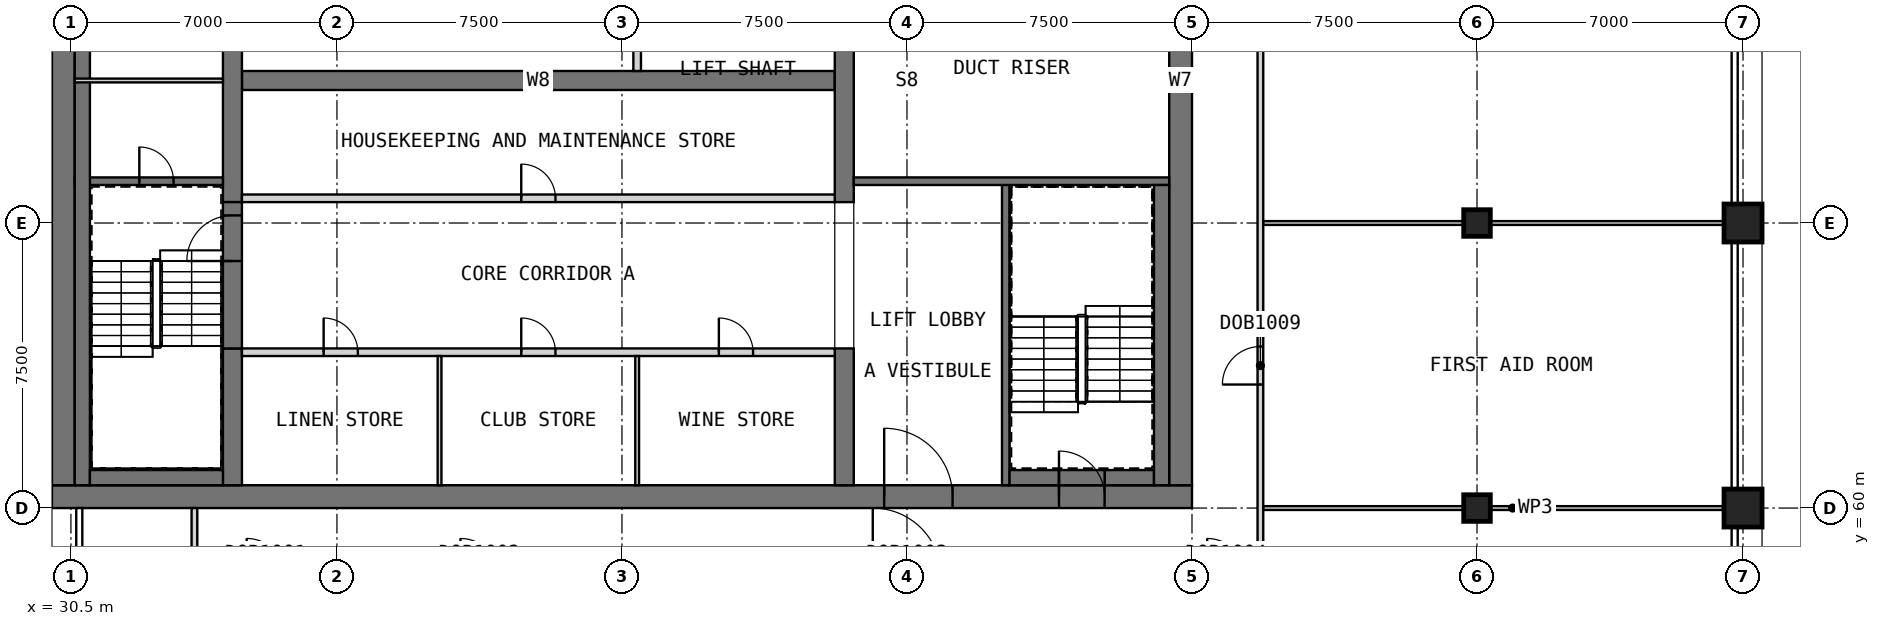
"""IFC4 building model, lengths in metres.
Left out: names, types, materials, properties, quantities, classifications, styles, units other than length and angle.
Written with IfcOpenShell. Run it as: python <this file> out.ifc"""

import sys

from ifc_helpers import new_model, si_unit, direction, frame, frame_2d, origin, origin_2d, place, context, subcontext, project, spatial, rectangle, extrude, element, fill, save


model = new_model("IFC4")
c1 = context("Model", 3, precision=1e-05, world=origin(), true_north=direction((0.0, 1.0)))
c2 = subcontext(c1, "Body", "Model", "MODEL_VIEW")
j1 = project(units=[si_unit("LENGTHUNIT", "METRE"), si_unit("PLANEANGLEUNIT", "RADIAN")], contexts=[c1])
p1 = place(None, origin())
s1 = spatial("IfcSite", under=j1, at=p1, CompositionType="ELEMENT")
p2 = place(p1, origin())
s2 = spatial("IfcBuilding", under=s1, at=p2, CompositionType="ELEMENT")
p3 = place(p2, frame((0.0, 0.0, 302.7)))
s3 = spatial("IfcBuildingStorey", under=s2, at=p3, CompositionType="ELEMENT", Elevation=302.7)
for number, where, z_axis, x_axis in (
    (1, (67.5, 60.0, 0.0), (0.0, 0.0, 1.0), (1.0, 0.0, 0.0)),
    (2, (67.5, 67.5, 0.0), (0.0, 0.0, 1.0), (1.0, 0.0, 0.0)),
):
    element("IfcColumn", number, at=place(p3, frame(where, z_axis=z_axis, x_axis=x_axis)), inside=s3, PredefinedType="COLUMN", context=c2, shape_type="SweptSolid", body=[
        extrude(rectangle(XDim=0.7, YDim=0.7, at=origin_2d()), origin(), (0.0, 0.0, 1.0), 6.0),
    ])
for number, where, z_axis, x_axis in (
    (3, (74.5, 60.0, 0.0), (0.0, 0.0, 1.0), (1.0, 0.0, 0.0)),
    (4, (74.5, 67.5, 0.0), (0.0, 0.0, 1.0), (1.0, 0.0, 0.0)),
):
    element("IfcColumn", number, at=place(p3, frame(where, z_axis=z_axis, x_axis=x_axis)), inside=s3, PredefinedType="COLUMN", context=c2, shape_type="SweptSolid", body=[
        extrude(rectangle(XDim=1.0, YDim=1.0, at=origin_2d()), origin(), (0.0, 0.0, 1.0), 6.0),
    ])
p4 = place(p3, frame((30.0, 60.3, 0.0), z_axis=(0.0, 0.0, 1.0), x_axis=(1.0, 0.0, 0.0)))
e5 = element("IfcWall", 5, at=p4, inside=s3, PredefinedType="SHEAR", context=c2, shape_type="SweptSolid", body=[
    extrude(rectangle(XDim=30.0, YDim=0.6, at=frame_2d((15.0, 0.0))), origin(), (0.0, 0.0, 1.0), 6.0),
])
p5 = place(p4, frame((21.9, 0.0, 0.0)))
e6 = element("IfcOpeningElement", 6, at=p5, cuts=e5, PredefinedType="OPENING", context=c2, shape_type="SweptSolid", body=[
    extrude(rectangle(XDim=1.8, YDim=2.1, at=frame_2d((0.9, 1.05))), frame((0.0, 0.31, 0.0), z_axis=(0.0, -1.0, 0.0), x_axis=(1.0, 0.0, 0.0)), (0.0, 0.0, 1.0), 0.62),
])
p6 = place(p4, frame((26.5, 0.0, 0.0)))
e7 = element("IfcOpeningElement", 7, at=p6, cuts=e5, PredefinedType="OPENING", context=c2, shape_type="SweptSolid", body=[
    extrude(rectangle(XDim=1.2, YDim=2.1, at=frame_2d((0.6, 1.05))), frame((0.0, 0.31, 0.0), z_axis=(0.0, -1.0, 0.0), x_axis=(1.0, 0.0, 0.0)), (0.0, 0.0, 1.0), 0.62),
])
p7 = place(p3, frame((30.3, 60.6, 0.0), z_axis=(0.0, 0.0, 1.0), x_axis=(0.0, 1.0, 0.0)))
e8 = element("IfcWall", 8, at=p7, inside=s3, PredefinedType="SHEAR", context=c2, shape_type="SweptSolid", body=[
    extrude(rectangle(XDim=21.3, YDim=0.6, at=frame_2d((10.65, 0.0))), origin(), (0.0, 0.0, 1.0), 6.0),
])
p8 = place(p3, frame((59.7, 60.6, 0.0), z_axis=(0.0, 0.0, 1.0), x_axis=(0.0, 1.0, 0.0)))
e9 = element("IfcWall", 9, at=p8, inside=s3, PredefinedType="SHEAR", context=c2, shape_type="SweptSolid", body=[
    extrude(rectangle(XDim=21.3, YDim=0.6, at=frame_2d((10.65, 0.0))), origin(), (0.0, 0.0, 1.0), 6.0),
])
p9 = place(p8, frame((14.9, 0.0, 0.0)))
e10 = element("IfcOpeningElement", 10, at=p9, cuts=e9, PredefinedType="OPENING", context=c2, shape_type="SweptSolid", body=[
    extrude(rectangle(XDim=1.8, YDim=2.1, at=frame_2d((0.9, 1.05))), frame((0.0, 0.31, 0.0), z_axis=(0.0, -1.0, 0.0), x_axis=(1.0, 0.0, 0.0)), (0.0, 0.0, 1.0), 0.62),
])
p10 = place(p3, frame((35.0, 71.25, 0.0), z_axis=(0.0, 0.0, 1.0), x_axis=(1.0, 0.0, 0.0)))
e11 = element("IfcWall", 11, at=p10, inside=s3, PredefinedType="SHEAR", context=c2, shape_type="SweptSolid", body=[
    extrude(rectangle(XDim=15.6, YDim=0.5, at=frame_2d((7.8, 0.0))), origin(), (0.0, 0.0, 1.0), 6.0),
])
p11 = place(p3, frame((34.75, 60.6, 0.0), z_axis=(0.0, 0.0, 1.0), x_axis=(0.0, 1.0, 0.0)))
e12 = element("IfcWall", 12, at=p11, inside=s3, PredefinedType="SHEAR", context=c2, shape_type="SweptSolid", body=[
    extrude(rectangle(XDim=3.6, YDim=0.5, at=frame_2d((1.8, 0.0))), origin(), (0.0, 0.0, 1.0), 6.0),
])
p12 = place(p3, frame((34.75, 68.05, 0.0), z_axis=(0.0, 0.0, 1.0), x_axis=(0.0, 1.0, 0.0)))
e13 = element("IfcWall", 13, at=p12, inside=s3, PredefinedType="SHEAR", context=c2, shape_type="SweptSolid", body=[
    extrude(rectangle(XDim=6.4, YDim=0.5, at=frame_2d((3.2, 0.0))), origin(), (0.0, 0.0, 1.0), 6.0),
])
p13 = place(p3, frame((50.85, 60.6, 0.0), z_axis=(0.0, 0.0, 1.0), x_axis=(0.0, 1.0, 0.0)))
e14 = element("IfcWall", 14, at=p13, inside=s3, PredefinedType="SHEAR", context=c2, shape_type="SweptSolid", body=[
    extrude(rectangle(XDim=3.6, YDim=0.5, at=frame_2d((1.8, 0.0))), origin(), (0.0, 0.0, 1.0), 6.0),
])
p14 = place(p3, frame((50.85, 68.05, 0.0), z_axis=(0.0, 0.0, 1.0), x_axis=(0.0, 1.0, 0.0)))
e15 = element("IfcWall", 15, at=p14, inside=s3, PredefinedType="SHEAR", context=c2, shape_type="SweptSolid", body=[
    extrude(rectangle(XDim=6.4, YDim=0.5, at=frame_2d((3.2, 0.0))), origin(), (0.0, 0.0, 1.0), 6.0),
])
p15 = place(p3, frame((35.0, 64.1, 0.0), z_axis=(0.0, 0.0, 1.0), x_axis=(1.0, 0.0, 0.0)))
e16 = element("IfcWall", 16, at=p15, inside=s3, PredefinedType="PARTITIONING", context=c2, shape_type="SweptSolid", body=[
    extrude(rectangle(XDim=15.6, YDim=0.2, at=frame_2d((7.8, 0.0))), origin(), (0.0, 0.0, 1.0), 5.7),
])
p16 = place(p15, frame((2.15, 0.0, 0.0)))
e17 = element("IfcOpeningElement", 17, at=p16, cuts=e16, PredefinedType="OPENING", context=c2, shape_type="SweptSolid", body=[
    extrude(rectangle(XDim=0.9, YDim=2.1, at=frame_2d((0.45, 1.05))), frame((0.0, 0.11, 0.0), z_axis=(0.0, -1.0, 0.0), x_axis=(1.0, 0.0, 0.0)), (0.0, 0.0, 1.0), 0.22),
])
p17 = place(p15, frame((7.35, 0.0, 0.0)))
e18 = element("IfcOpeningElement", 18, at=p17, cuts=e16, PredefinedType="OPENING", context=c2, shape_type="SweptSolid", body=[
    extrude(rectangle(XDim=0.9, YDim=2.1, at=frame_2d((0.45, 1.05))), frame((0.0, 0.11, 0.0), z_axis=(0.0, -1.0, 0.0), x_axis=(1.0, 0.0, 0.0)), (0.0, 0.0, 1.0), 0.22),
])
p18 = place(p15, frame((12.55, 0.0, 0.0)))
e19 = element("IfcOpeningElement", 19, at=p18, cuts=e16, PredefinedType="OPENING", context=c2, shape_type="SweptSolid", body=[
    extrude(rectangle(XDim=0.9, YDim=2.1, at=frame_2d((0.45, 1.05))), frame((0.0, 0.11, 0.0), z_axis=(0.0, -1.0, 0.0), x_axis=(1.0, 0.0, 0.0)), (0.0, 0.0, 1.0), 0.22),
])
for number, where, z_axis, x_axis in (
    (20, (40.2, 60.6, 0.0), (0.0, 0.0, 1.0), (0.0, 1.0, 0.0)),
    (21, (45.4, 60.6, 0.0), (0.0, 0.0, 1.0), (0.0, 1.0, 0.0)),
):
    element("IfcWall", number, at=place(p3, frame(where, z_axis=z_axis, x_axis=x_axis)), inside=s3, PredefinedType="PARTITIONING", context=c2, shape_type="SweptSolid", body=[
        extrude(rectangle(XDim=3.4, YDim=0.1, at=frame_2d((1.7, 0.0))), origin(), (0.0, 0.0, 1.0), 5.7),
    ])
p19 = place(p3, frame((35.0, 68.15, 0.0), z_axis=(0.0, 0.0, 1.0), x_axis=(1.0, 0.0, 0.0)))
e22 = element("IfcWall", 22, at=p19, inside=s3, PredefinedType="PARTITIONING", context=c2, shape_type="SweptSolid", body=[
    extrude(rectangle(XDim=15.6, YDim=0.2, at=frame_2d((7.8, 0.0))), origin(), (0.0, 0.0, 1.0), 5.7),
])
p20 = place(p19, frame((7.35, 0.0, 0.0)))
e23 = element("IfcOpeningElement", 23, at=p20, cuts=e22, PredefinedType="OPENING", context=c2, shape_type="SweptSolid", body=[
    extrude(rectangle(XDim=0.9, YDim=2.1, at=frame_2d((0.45, 1.05))), frame((0.0, 0.11, 0.0), z_axis=(0.0, -1.0, 0.0), x_axis=(1.0, 0.0, 0.0)), (0.0, 0.0, 1.0), 0.22),
])
p21 = place(p3, frame((45.4, 71.5, 0.0), z_axis=(0.0, 0.0, 1.0), x_axis=(0.0, 1.0, 0.0)))
e24 = element("IfcWall", 24, at=p21, inside=s3, PredefinedType="SOLIDWALL", context=c2, shape_type="SweptSolid", body=[
    extrude(rectangle(XDim=2.0, YDim=0.2, at=frame_2d((1.0, 0.0))), origin(), (0.0, 0.0, 1.0), 6.0),
])
p22 = place(p3, frame((34.75, 64.2, 0.0), z_axis=(0.0, 0.0, 1.0), x_axis=(0.0, 1.0, 0.0)))
e25 = element("IfcWall", 25, at=p22, inside=s3, PredefinedType="SOLIDWALL", context=c2, shape_type="SweptSolid", body=[
    extrude(rectangle(XDim=3.85, YDim=0.5, at=frame_2d((1.925, 0.0))), origin(), (0.0, 0.0, 1.0), 4.8),
])
p23 = place(p22, frame((2.3, 0.0, 0.0)))
e26 = element("IfcOpeningElement", 26, at=p23, cuts=e25, PredefinedType="OPENING", context=c2, shape_type="SweptSolid", body=[
    extrude(rectangle(XDim=1.2, YDim=2.1, at=frame_2d((0.6, 1.05))), frame((0.0, 0.26, 0.0), z_axis=(0.0, -1.0, 0.0), x_axis=(1.0, 0.0, 0.0)), (0.0, 0.0, 1.0), 0.52),
])
p24 = place(p3, frame((30.6, 68.6, 0.0), z_axis=(0.0, 0.0, 1.0), x_axis=(1.0, 0.0, 0.0)))
e27 = element("IfcWall", 27, at=p24, inside=s3, PredefinedType="SOLIDWALL", context=c2, shape_type="SweptSolid", body=[
    extrude(rectangle(XDim=3.9, YDim=0.2, at=frame_2d((1.95, 0.0))), origin(), (0.0, 0.0, 1.0), 5.7),
])
p25 = place(p24, frame((1.7, 0.0, 0.0)))
e28 = element("IfcOpeningElement", 28, at=p25, cuts=e27, PredefinedType="OPENING", context=c2, shape_type="SweptSolid", body=[
    extrude(rectangle(XDim=0.9, YDim=2.1, at=frame_2d((0.45, 1.05))), frame((0.0, 0.11, 0.0), z_axis=(0.0, -1.0, 0.0), x_axis=(1.0, 0.0, 0.0)), (0.0, 0.0, 1.0), 0.22),
])
p26 = place(p3, frame((55.1, 60.6, 0.0), z_axis=(0.0, 0.0, 1.0), x_axis=(0.0, 1.0, 0.0)))
e29 = element("IfcWall", 29, at=p26, inside=s3, PredefinedType="SOLIDWALL", context=c2, shape_type="SweptSolid", body=[
    extrude(rectangle(XDim=8.0, YDim=0.2, at=frame_2d((4.0, 0.0))), origin(), (0.0, 0.0, 1.0), 5.7),
])
p27 = place(p3, frame((51.1, 68.6, 0.0), z_axis=(0.0, 0.0, 1.0), x_axis=(1.0, 0.0, 0.0)))
e30 = element("IfcWall", 30, at=p27, inside=s3, PredefinedType="SOLIDWALL", context=c2, shape_type="SweptSolid", body=[
    extrude(rectangle(XDim=8.3, YDim=0.2, at=frame_2d((4.15, 0.0))), origin(), (0.0, 0.0, 1.0), 5.7),
])
p28 = place(p3, frame((30.8, 60.6, 0.0), z_axis=(0.0, 0.0, 1.0), x_axis=(0.0, 1.0, 0.0)))
e31 = element("IfcWall", 31, at=p28, inside=s3, PredefinedType="SOLIDWALL", context=c2, shape_type="SweptSolid", body=[
    extrude(rectangle(XDim=21.3, YDim=0.4, at=frame_2d((10.65, 0.0))), origin(), (0.0, 0.0, 1.0), 5.7),
])
p29 = place(p3, frame((31.0, 60.8, 0.0), z_axis=(0.0, 0.0, 1.0), x_axis=(1.0, 0.0, 0.0)))
e32 = element("IfcWall", 32, at=p29, inside=s3, PredefinedType="SOLIDWALL", context=c2, shape_type="SweptSolid", body=[
    extrude(rectangle(XDim=3.5, YDim=0.4, at=frame_2d((1.75, 0.0))), origin(), (0.0, 0.0, 1.0), 5.7),
])
for number, where, z_axis, x_axis in (
    (33, (55.2, 60.8, 0.0), (0.0, 0.0, 1.0), (1.0, 0.0, 0.0)),
    (34, (57.7, 60.8, 0.0), (0.0, 0.0, 1.0), (1.0, 0.0, 0.0)),
):
    element("IfcWall", number, at=place(p3, frame(where, z_axis=z_axis, x_axis=x_axis)), inside=s3, PredefinedType="SOLIDWALL", context=c2, shape_type="SweptSolid", body=[
        extrude(rectangle(XDim=1.3, YDim=0.4, at=frame_2d((0.65, 0.0))), origin(), (0.0, 0.0, 1.0), 5.7),
    ])
p30 = place(p3, frame((59.2, 60.6, 0.0), z_axis=(0.0, 0.0, 1.0), x_axis=(0.0, 1.0, 0.0)))
e35 = element("IfcWall", 35, at=p30, inside=s3, PredefinedType="SOLIDWALL", context=c2, shape_type="SweptSolid", body=[
    extrude(rectangle(XDim=7.9, YDim=0.4, at=frame_2d((3.95, 0.0))), origin(), (0.0, 0.0, 1.0), 5.7),
])
p31 = place(p3, frame((56.5, 60.8, 3.2), z_axis=(0.0, 0.0, 1.0), x_axis=(1.0, 0.0, 0.0)))
e36 = element("IfcWall", 36, at=p31, inside=s3, PredefinedType="SOLIDWALL", context=c2, shape_type="SweptSolid", body=[
    extrude(rectangle(XDim=1.2, YDim=0.4, at=frame_2d((0.6, 0.0))), origin(), (0.0, 0.0, 1.0), 2.5),
])
p32 = place(p3, frame((30.6, 71.25, 0.0), z_axis=(0.0, 0.0, 1.0), x_axis=(1.0, 0.0, 0.0)))
e37 = element("IfcWall", 37, at=p32, inside=s3, PredefinedType="PARTITIONING", context=c2, shape_type="SweptSolid", body=[
    extrude(rectangle(XDim=3.9, YDim=0.1, at=frame_2d((1.95, 0.0))), origin(), (0.0, 0.0, 1.0), 5.7),
])
p33 = place(p3, frame((33.75, 58.275, 0.0), z_axis=(0.0, 0.0, 1.0), x_axis=(0.0, 1.0, 0.0)))
e38 = element("IfcWall", 38, at=p33, inside=s3, PredefinedType="PARTITIONING", context=c2, shape_type="SweptSolid", body=[
    extrude(rectangle(XDim=1.725, YDim=0.15, at=frame_2d((0.863, 0.0))), origin(), (0.0, 0.0, 1.0), 5.7),
])
p34 = place(p3, frame((61.8, 58.275, 0.0), z_axis=(0.0, 0.0, 1.0), x_axis=(0.0, 1.0, 0.0)))
e39 = element("IfcWall", 39, at=p34, inside=s3, PredefinedType="PARTITIONING", context=c2, shape_type="SweptSolid", body=[
    extrude(rectangle(XDim=25.95, YDim=0.15, at=frame_2d((12.975, 0.0))), origin(), (0.0, 0.0, 1.0), 5.7),
])
p35 = place(p34, frame((4.975, 0.0, 0.0)))
e40 = element("IfcOpeningElement", 40, at=p35, cuts=e39, PredefinedType="OPENING", context=c2, shape_type="SweptSolid", body=[
    extrude(rectangle(XDim=1.0, YDim=2.1, at=frame_2d((0.5, 1.05))), frame((0.0, 0.085, 0.0), z_axis=(0.0, -1.0, 0.0), x_axis=(1.0, 0.0, 0.0)), (0.0, 0.0, 1.0), 0.17),
])
p36 = place(p34, frame((13.95, 0.0, 0.0)))
e41 = element("IfcOpeningElement", 41, at=p36, cuts=e39, PredefinedType="OPENING", context=c2, shape_type="SweptSolid", body=[
    extrude(rectangle(XDim=1.8, YDim=2.1, at=frame_2d((0.9, 1.05))), frame((0.0, 0.085, 0.0), z_axis=(0.0, -1.0, 0.0), x_axis=(1.0, 0.0, 0.0)), (0.0, 0.0, 1.0), 0.17),
])
p37 = place(p34, frame((21.85, 0.0, 0.0)))
e42 = element("IfcOpeningElement", 42, at=p37, cuts=e39, PredefinedType="OPENING", context=c2, shape_type="SweptSolid", body=[
    extrude(rectangle(XDim=1.0, YDim=2.1, at=frame_2d((0.5, 1.05))), frame((0.0, 0.085, 0.0), z_axis=(0.0, -1.0, 0.0), x_axis=(1.0, 0.0, 0.0)), (0.0, 0.0, 1.0), 0.17),
])
for number, where, z_axis, x_axis in (
    (43, (61.875, 60.0, 0.0), (0.0, 0.0, 1.0), (1.0, 0.0, 0.0)),
    (44, (61.875, 67.5, 0.0), (0.0, 0.0, 1.0), (1.0, 0.0, 0.0)),
):
    element("IfcWall", number, at=place(p3, frame(where, z_axis=z_axis, x_axis=x_axis)), inside=s3, PredefinedType="PARTITIONING", context=c2, shape_type="SweptSolid", body=[
        extrude(rectangle(XDim=13.125, YDim=0.1, at=frame_2d((6.562, 0.0))), origin(), (0.0, 0.0, 1.0), 5.7),
    ])
p38 = place(p16, origin())
e45 = element("IfcDoor", 45, at=p38, inside=s3, OperationType="SINGLE_SWING_LEFT", PredefinedType="DOOR", context=c2, shape_type="SweptSolid", body=[
    extrude(rectangle(XDim=0.9, YDim=2.1, at=frame_2d((0.45, 1.05))), frame((0.0, 0.025, 0.0), z_axis=(0.0, -1.0, 0.0), x_axis=(1.0, 0.0, 0.0)), (0.0, 0.0, 1.0), 0.05),
])
fill(e17, e45)
p39 = place(p17, origin())
e46 = element("IfcDoor", 46, at=p39, inside=s3, OperationType="SINGLE_SWING_RIGHT", PredefinedType="DOOR", context=c2, shape_type="SweptSolid", body=[
    extrude(rectangle(XDim=0.9, YDim=2.1, at=frame_2d((0.45, 1.05))), frame((0.0, 0.025, 0.0), z_axis=(0.0, -1.0, 0.0), x_axis=(1.0, 0.0, 0.0)), (0.0, 0.0, 1.0), 0.05),
])
fill(e18, e46)
p40 = place(p18, origin())
e47 = element("IfcDoor", 47, at=p40, inside=s3, OperationType="SINGLE_SWING_LEFT", PredefinedType="DOOR", context=c2, shape_type="SweptSolid", body=[
    extrude(rectangle(XDim=0.9, YDim=2.1, at=frame_2d((0.45, 1.05))), frame((0.0, 0.025, 0.0), z_axis=(0.0, -1.0, 0.0), x_axis=(1.0, 0.0, 0.0)), (0.0, 0.0, 1.0), 0.05),
])
fill(e19, e47)
p41 = place(p20, origin())
e48 = element("IfcDoor", 48, at=p41, inside=s3, OperationType="SINGLE_SWING_LEFT", PredefinedType="DOOR", context=c2, shape_type="SweptSolid", body=[
    extrude(rectangle(XDim=0.9, YDim=2.1, at=frame_2d((0.45, 1.05))), frame((0.0, 0.025, 0.0), z_axis=(0.0, -1.0, 0.0), x_axis=(1.0, 0.0, 0.0)), (0.0, 0.0, 1.0), 0.05),
])
fill(e23, e48)
p42 = place(p5, origin())
e49 = element("IfcDoor", 49, at=p42, inside=s3, OperationType="DOUBLE_DOOR_SINGLE_SWING", PredefinedType="DOOR", context=c2, shape_type="SweptSolid", body=[
    extrude(rectangle(XDim=1.8, YDim=2.1, at=frame_2d((0.9, 1.05))), frame((0.0, 0.025, 0.0), z_axis=(0.0, -1.0, 0.0), x_axis=(1.0, 0.0, 0.0)), (0.0, 0.0, 1.0), 0.05),
])
fill(e6, e49)
p43 = place(p23, origin())
e50 = element("IfcDoor", 50, at=p43, inside=s3, OperationType="SINGLE_SWING_LEFT", PredefinedType="DOOR", context=c2, shape_type="SweptSolid", body=[
    extrude(rectangle(XDim=1.2, YDim=2.1, at=frame_2d((0.6, 1.05))), frame((0.0, 0.025, 0.0), z_axis=(0.0, -1.0, 0.0), x_axis=(1.0, 0.0, 0.0)), (0.0, 0.0, 1.0), 0.05),
])
fill(e26, e50)
p44 = place(p25, origin())
e51 = element("IfcDoor", 51, at=p44, inside=s3, OperationType="SINGLE_SWING_LEFT", PredefinedType="DOOR", context=c2, shape_type="SweptSolid", body=[
    extrude(rectangle(XDim=0.9, YDim=2.1, at=frame_2d((0.45, 1.05))), frame((0.0, 0.025, 0.0), z_axis=(0.0, -1.0, 0.0), x_axis=(1.0, 0.0, 0.0)), (0.0, 0.0, 1.0), 0.05),
])
fill(e28, e51)
p45 = place(p6, origin())
e52 = element("IfcDoor", 52, at=p45, inside=s3, OperationType="SINGLE_SWING_LEFT", PredefinedType="DOOR", context=c2, shape_type="SweptSolid", body=[
    extrude(rectangle(XDim=1.2, YDim=2.1, at=frame_2d((0.6, 1.05))), frame((0.0, 0.025, 0.0), z_axis=(0.0, -1.0, 0.0), x_axis=(1.0, 0.0, 0.0)), (0.0, 0.0, 1.0), 0.05),
])
fill(e7, e52)
p46 = place(p35, origin())
e53 = element("IfcDoor", 53, at=p46, inside=s3, OperationType="SINGLE_SWING_RIGHT", PredefinedType="DOOR", context=c2, shape_type="SweptSolid", body=[
    extrude(rectangle(XDim=1.0, YDim=2.1, at=frame_2d((0.5, 1.05))), frame((0.0, 0.025, 0.0), z_axis=(0.0, -1.0, 0.0), x_axis=(1.0, 0.0, 0.0)), (0.0, 0.0, 1.0), 0.05),
])
fill(e40, e53)
save(model, sys.argv[1])
